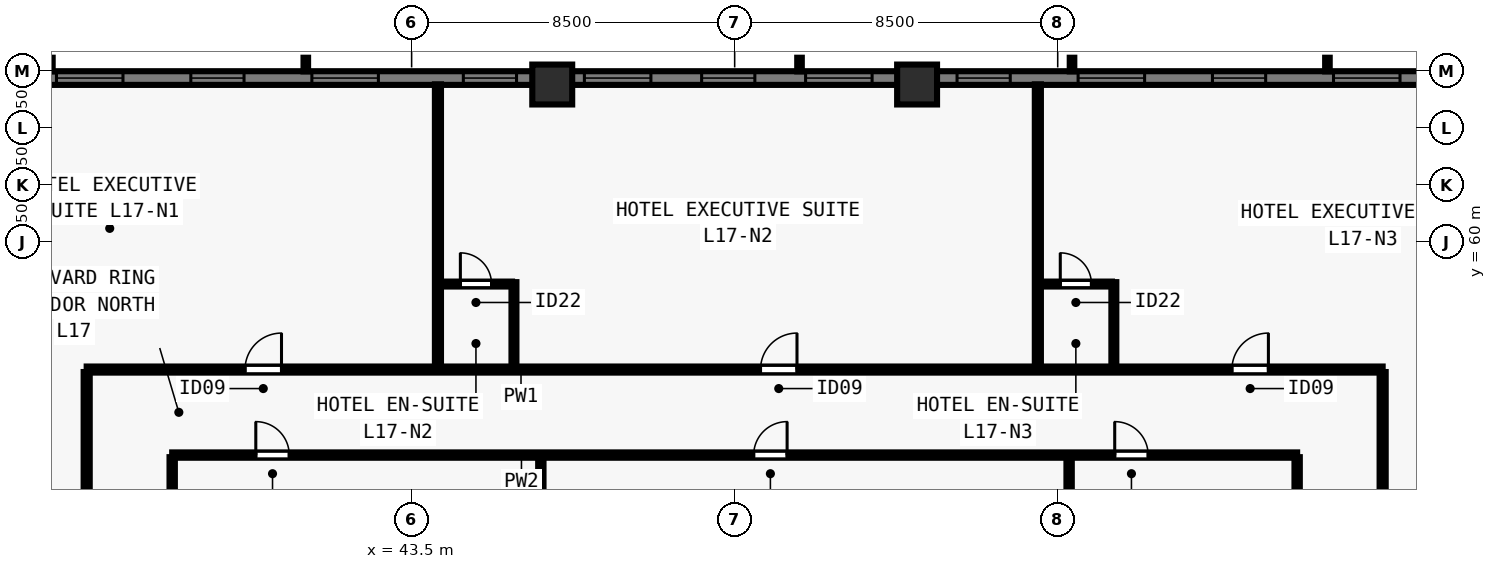
"""IFC4 building model, lengths in metres.
Left out: names, types, materials, properties, quantities, classifications, styles, units other than length and angle.
Written with IfcOpenShell. Run it as: python <this file> out.ifc"""

import sys

from ifc_helpers import new_model, si_unit, direction, frame, frame_2d, origin, origin_2d, place, context, subcontext, project, spatial, rectangle, extrude, element, fill, save


model = new_model("IFC4")
c1 = context("Model", 3, precision=1e-05, world=origin(), true_north=direction((0.0, 1.0)))
c2 = subcontext(c1, "Body", "Model", "MODEL_VIEW")
j1 = project(units=[si_unit("LENGTHUNIT", "METRE"), si_unit("PLANEANGLEUNIT", "RADIAN")], contexts=[c1])
p1 = place(None, origin())
s1 = spatial("IfcSite", under=j1, at=p1, CompositionType="ELEMENT")
p2 = place(p1, origin())
s2 = spatial("IfcBuilding", under=s1, at=p2, CompositionType="ELEMENT")
p3 = place(p2, frame((0.0, 0.0, 65.5)))
s3 = spatial("IfcBuildingStorey", under=s2, at=p3, CompositionType="ELEMENT", Elevation=65.5)
for number, where, z_axis, x_axis in (
    (1, (56.8, 64.15, 0.0), (0.0, 0.0, 1.0), (1.0, 0.0, 0.0)),
    (2, (47.2, 64.15, 0.0), (0.0, 0.0, 1.0), (1.0, 0.0, 0.0)),
):
    element("IfcColumn", number, at=place(p3, frame(where, z_axis=z_axis, x_axis=x_axis)), inside=s3, PredefinedType="COLUMN", context=c2, shape_type="SweptSolid", body=[
        extrude(rectangle(XDim=1.05, YDim=1.05, at=origin_2d()), origin(), (0.0, 0.0, 1.0), 3.5),
    ])
p4 = place(p3, frame((29.5, 64.32, 0.0), z_axis=(0.0, 0.0, 1.0), x_axis=(1.0, 0.0, 0.0)))
e3 = element("IfcWall", 3, at=p4, inside=s3, PredefinedType="SOLIDWALL", context=c2, shape_type="SweptSolid", body=[
    extrude(rectangle(XDim=44.662, YDim=0.36, at=frame_2d((22.331, 0.0))), origin(), (0.0, 0.0, 1.0), 3.28),
])
p5 = place(p4, frame((4.655, 0.0, 0.8)))
e4 = element("IfcOpeningElement", 4, at=p5, cuts=e3, PredefinedType="OPENING", context=c2, shape_type="SweptSolid", body=[
    extrude(rectangle(XDim=1.75, YDim=1.544, at=frame_2d((0.875, 0.772))), frame((0.0, 0.19, 0.0), z_axis=(0.0, -1.0, 0.0), x_axis=(1.0, 0.0, 0.0)), (0.0, 0.0, 1.0), 0.38),
])
p6 = place(p4, frame((8.19, 0.0, 0.8)))
e5 = element("IfcOpeningElement", 5, at=p6, cuts=e3, PredefinedType="OPENING", context=c2, shape_type="SweptSolid", body=[
    extrude(rectangle(XDim=1.4, YDim=1.544, at=frame_2d((0.7, 0.772))), frame((0.0, 0.19, 0.0), z_axis=(0.0, -1.0, 0.0), x_axis=(1.0, 0.0, 0.0)), (0.0, 0.0, 1.0), 0.38),
])
p7 = place(p4, frame((11.375, 0.0, 0.8)))
e6 = element("IfcOpeningElement", 6, at=p7, cuts=e3, PredefinedType="OPENING", context=c2, shape_type="SweptSolid", body=[
    extrude(rectangle(XDim=1.75, YDim=1.544, at=frame_2d((0.875, 0.772))), frame((0.0, 0.19, 0.0), z_axis=(0.0, -1.0, 0.0), x_axis=(1.0, 0.0, 0.0)), (0.0, 0.0, 1.0), 0.38),
])
p8 = place(p4, frame((15.361, 0.0, 0.8)))
e7 = element("IfcOpeningElement", 7, at=p8, cuts=e3, PredefinedType="OPENING", context=c2, shape_type="SweptSolid", body=[
    extrude(rectangle(XDim=1.4, YDim=1.544, at=frame_2d((0.7, 0.772))), frame((0.0, 0.19, 0.0), z_axis=(0.0, -1.0, 0.0), x_axis=(1.0, 0.0, 0.0)), (0.0, 0.0, 1.0), 0.38),
])
p9 = place(p4, frame((18.546, 0.0, 0.8)))
e8 = element("IfcOpeningElement", 8, at=p9, cuts=e3, PredefinedType="OPENING", context=c2, shape_type="SweptSolid", body=[
    extrude(rectangle(XDim=1.75, YDim=1.544, at=frame_2d((0.875, 0.772))), frame((0.0, 0.19, 0.0), z_axis=(0.0, -1.0, 0.0), x_axis=(1.0, 0.0, 0.0)), (0.0, 0.0, 1.0), 0.38),
])
p10 = place(p4, frame((21.631, 0.0, 0.8)))
e9 = element("IfcOpeningElement", 9, at=p10, cuts=e3, PredefinedType="OPENING", context=c2, shape_type="SweptSolid", body=[
    extrude(rectangle(XDim=1.4, YDim=1.544, at=frame_2d((0.7, 0.772))), frame((0.0, 0.19, 0.0), z_axis=(0.0, -1.0, 0.0), x_axis=(1.0, 0.0, 0.0)), (0.0, 0.0, 1.0), 0.38),
])
p11 = place(p4, frame((24.366, 0.0, 0.8)))
e10 = element("IfcOpeningElement", 10, at=p11, cuts=e3, PredefinedType="OPENING", context=c2, shape_type="SweptSolid", body=[
    extrude(rectangle(XDim=1.75, YDim=1.544, at=frame_2d((0.875, 0.772))), frame((0.0, 0.19, 0.0), z_axis=(0.0, -1.0, 0.0), x_axis=(1.0, 0.0, 0.0)), (0.0, 0.0, 1.0), 0.38),
])
p12 = place(p4, frame((28.351, 0.0, 0.8)))
e11 = element("IfcOpeningElement", 11, at=p12, cuts=e3, PredefinedType="OPENING", context=c2, shape_type="SweptSolid", body=[
    extrude(rectangle(XDim=1.4, YDim=1.544, at=frame_2d((0.7, 0.772))), frame((0.0, 0.19, 0.0), z_axis=(0.0, -1.0, 0.0), x_axis=(1.0, 0.0, 0.0)), (0.0, 0.0, 1.0), 0.38),
])
p13 = place(p4, frame((31.537, 0.0, 0.8)))
e12 = element("IfcOpeningElement", 12, at=p13, cuts=e3, PredefinedType="OPENING", context=c2, shape_type="SweptSolid", body=[
    extrude(rectangle(XDim=1.75, YDim=1.544, at=frame_2d((0.875, 0.772))), frame((0.0, 0.19, 0.0), z_axis=(0.0, -1.0, 0.0), x_axis=(1.0, 0.0, 0.0)), (0.0, 0.0, 1.0), 0.38),
])
p14 = place(p4, frame((35.072, 0.0, 0.8)))
e13 = element("IfcOpeningElement", 13, at=p14, cuts=e3, PredefinedType="OPENING", context=c2, shape_type="SweptSolid", body=[
    extrude(rectangle(XDim=1.4, YDim=1.544, at=frame_2d((0.7, 0.772))), frame((0.0, 0.19, 0.0), z_axis=(0.0, -1.0, 0.0), x_axis=(1.0, 0.0, 0.0)), (0.0, 0.0, 1.0), 0.38),
])
p15 = place(p4, frame((38.257, 0.0, 0.8)))
e14 = element("IfcOpeningElement", 14, at=p15, cuts=e3, PredefinedType="OPENING", context=c2, shape_type="SweptSolid", body=[
    extrude(rectangle(XDim=1.75, YDim=1.544, at=frame_2d((0.875, 0.772))), frame((0.0, 0.19, 0.0), z_axis=(0.0, -1.0, 0.0), x_axis=(1.0, 0.0, 0.0)), (0.0, 0.0, 1.0), 0.38),
])
p16 = place(p3, frame((34.95, 56.65, 0.0), z_axis=(0.0, 0.0, 1.0), x_axis=(1.0, 0.0, 0.0)))
e15 = element("IfcWall", 15, at=p16, inside=s3, PredefinedType="PARTITIONING", context=c2, shape_type="SweptSolid", body=[
    extrude(rectangle(XDim=34.1, YDim=0.16, at=frame_2d((17.05, 0.0))), origin(), (0.0, 0.0, 1.0), 3.28),
])
p17 = place(p16, frame((4.166, 0.0, 0.0)))
e16 = element("IfcOpeningElement", 16, at=p17, cuts=e15, PredefinedType="OPENING", context=c2, shape_type="SweptSolid", body=[
    extrude(rectangle(XDim=0.96, YDim=2.15, at=frame_2d((0.48, 1.075))), frame((0.0, 0.09, 0.0), z_axis=(0.0, -1.0, 0.0), x_axis=(1.0, 0.0, 0.0)), (0.0, 0.0, 1.0), 0.18),
])
p18 = place(p16, frame((17.73, 0.0, 0.0)))
e17 = element("IfcOpeningElement", 17, at=p18, cuts=e15, PredefinedType="OPENING", context=c2, shape_type="SweptSolid", body=[
    extrude(rectangle(XDim=0.96, YDim=2.15, at=frame_2d((0.48, 1.075))), frame((0.0, 0.09, 0.0), z_axis=(0.0, -1.0, 0.0), x_axis=(1.0, 0.0, 0.0)), (0.0, 0.0, 1.0), 0.18),
])
p19 = place(p16, frame((30.134, 0.0, 0.0)))
e18 = element("IfcOpeningElement", 18, at=p19, cuts=e15, PredefinedType="OPENING", context=c2, shape_type="SweptSolid", body=[
    extrude(rectangle(XDim=0.96, YDim=2.15, at=frame_2d((0.48, 1.075))), frame((0.0, 0.09, 0.0), z_axis=(0.0, -1.0, 0.0), x_axis=(1.0, 0.0, 0.0)), (0.0, 0.0, 1.0), 0.18),
])
p20 = place(p3, frame((34.95, 21.415, 0.0), z_axis=(0.0, 0.0, 1.0), x_axis=(0.0, 1.0, 0.0)))
e19 = element("IfcWall", 19, at=p20, inside=s3, PredefinedType="PARTITIONING", context=c2, shape_type="SweptSolid", body=[
    extrude(rectangle(XDim=35.17, YDim=0.16, at=frame_2d((17.585, 0.0))), origin(), (0.0, 0.0, 1.0), 3.28),
])
p21 = place(p20, frame((9.414, 0.0, 0.0)))
e20 = element("IfcOpeningElement", 20, at=p21, cuts=e19, PredefinedType="OPENING", context=c2, shape_type="SweptSolid", body=[
    extrude(rectangle(XDim=0.96, YDim=2.15, at=frame_2d((0.48, 1.075))), frame((0.0, 0.09, 0.0), z_axis=(0.0, -1.0, 0.0), x_axis=(1.0, 0.0, 0.0)), (0.0, 0.0, 1.0), 0.18),
])
p22 = place(p20, frame((26.814, 0.0, 0.0)))
e21 = element("IfcOpeningElement", 21, at=p22, cuts=e19, PredefinedType="OPENING", context=c2, shape_type="SweptSolid", body=[
    extrude(rectangle(XDim=0.96, YDim=2.15, at=frame_2d((0.48, 1.075))), frame((0.0, 0.09, 0.0), z_axis=(0.0, -1.0, 0.0), x_axis=(1.0, 0.0, 0.0)), (0.0, 0.0, 1.0), 0.18),
])
p23 = place(p3, frame((69.05, 21.415, 0.0), z_axis=(0.0, 0.0, 1.0), x_axis=(0.0, 1.0, 0.0)))
e22 = element("IfcWall", 22, at=p23, inside=s3, PredefinedType="PARTITIONING", context=c2, shape_type="SweptSolid", body=[
    extrude(rectangle(XDim=35.17, YDim=0.16, at=frame_2d((17.585, 0.0))), origin(), (0.0, 0.0, 1.0), 3.28),
])
p24 = place(p23, frame((9.746, 0.0, 0.0)))
e23 = element("IfcOpeningElement", 23, at=p24, cuts=e22, PredefinedType="OPENING", context=c2, shape_type="SweptSolid", body=[
    extrude(rectangle(XDim=0.96, YDim=2.15, at=frame_2d((0.48, 1.075))), frame((0.0, 0.09, 0.0), z_axis=(0.0, -1.0, 0.0), x_axis=(1.0, 0.0, 0.0)), (0.0, 0.0, 1.0), 0.18),
])
p25 = place(p23, frame((27.146, 0.0, 0.0)))
e24 = element("IfcOpeningElement", 24, at=p25, cuts=e22, PredefinedType="OPENING", context=c2, shape_type="SweptSolid", body=[
    extrude(rectangle(XDim=0.96, YDim=2.15, at=frame_2d((0.48, 1.075))), frame((0.0, 0.09, 0.0), z_axis=(0.0, -1.0, 0.0), x_axis=(1.0, 0.0, 0.0)), (0.0, 0.0, 1.0), 0.18),
])
p26 = place(p3, frame((37.2, 54.4, 0.0), z_axis=(0.0, 0.0, 1.0), x_axis=(1.0, 0.0, 0.0)))
e25 = element("IfcWall", 25, at=p26, inside=s3, PredefinedType="PARTITIONING", context=c2, shape_type="SweptSolid", body=[
    extrude(rectangle(XDim=29.6, YDim=0.14, at=frame_2d((14.8, 0.0))), origin(), (0.0, 0.0, 1.0), 3.28),
])
p27 = place(p26, frame((2.2, 0.0, 0.0)))
e26 = element("IfcOpeningElement", 26, at=p27, cuts=e25, PredefinedType="OPENING", context=c2, shape_type="SweptSolid", body=[
    extrude(rectangle(XDim=0.88, YDim=2.1, at=frame_2d((0.44, 1.05))), frame((0.0, 0.08, 0.0), z_axis=(0.0, -1.0, 0.0), x_axis=(1.0, 0.0, 0.0)), (0.0, 0.0, 1.0), 0.16),
])
p28 = place(p26, frame((15.3, 0.0, 0.0)))
e27 = element("IfcOpeningElement", 27, at=p28, cuts=e25, PredefinedType="OPENING", context=c2, shape_type="SweptSolid", body=[
    extrude(rectangle(XDim=0.88, YDim=2.1, at=frame_2d((0.44, 1.05))), frame((0.0, 0.08, 0.0), z_axis=(0.0, -1.0, 0.0), x_axis=(1.0, 0.0, 0.0)), (0.0, 0.0, 1.0), 0.16),
])
p29 = place(p26, frame((24.8, 0.0, 0.0)))
e28 = element("IfcOpeningElement", 28, at=p29, cuts=e25, PredefinedType="OPENING", context=c2, shape_type="SweptSolid", body=[
    extrude(rectangle(XDim=0.88, YDim=2.1, at=frame_2d((0.44, 1.05))), frame((0.0, 0.08, 0.0), z_axis=(0.0, -1.0, 0.0), x_axis=(1.0, 0.0, 0.0)), (0.0, 0.0, 1.0), 0.16),
])
p30 = place(p3, frame((37.2, 40.8, 0.0), z_axis=(0.0, 0.0, 1.0), x_axis=(0.0, 1.0, 0.0)))
e29 = element("IfcWall", 29, at=p30, inside=s3, PredefinedType="PARTITIONING", context=c2, shape_type="SweptSolid", body=[
    extrude(rectangle(XDim=13.545, YDim=0.14, at=frame_2d((6.772, 0.0))), origin(), (0.0, 0.0, 1.0), 3.28),
])
p31 = place(p30, frame((2.5, 0.0, 0.0)))
e30 = element("IfcOpeningElement", 30, at=p31, cuts=e29, PredefinedType="OPENING", context=c2, shape_type="SweptSolid", body=[
    extrude(rectangle(XDim=0.88, YDim=2.1, at=frame_2d((0.44, 1.05))), frame((0.0, 0.08, 0.0), z_axis=(0.0, -1.0, 0.0), x_axis=(1.0, 0.0, 0.0)), (0.0, 0.0, 1.0), 0.16),
])
p32 = place(p3, frame((66.8, 40.8, 0.0), z_axis=(0.0, 0.0, 1.0), x_axis=(0.0, 1.0, 0.0)))
e31 = element("IfcWall", 31, at=p32, inside=s3, PredefinedType="PARTITIONING", context=c2, shape_type="SweptSolid", body=[
    extrude(rectangle(XDim=13.545, YDim=0.14, at=frame_2d((6.772, 0.0))), origin(), (0.0, 0.0, 1.0), 3.28),
])
p33 = place(p32, frame((2.5, 0.0, 0.0)))
e32 = element("IfcOpeningElement", 32, at=p33, cuts=e31, PredefinedType="OPENING", context=c2, shape_type="SweptSolid", body=[
    extrude(rectangle(XDim=0.88, YDim=2.1, at=frame_2d((0.44, 1.05))), frame((0.0, 0.08, 0.0), z_axis=(0.0, -1.0, 0.0), x_axis=(1.0, 0.0, 0.0)), (0.0, 0.0, 1.0), 0.16),
])
p34 = place(p3, frame((46.9, 47.76, 0.0), z_axis=(0.0, 0.0, 1.0), x_axis=(0.0, 1.0, 0.0)))
e33 = element("IfcWall", 33, at=p34, inside=s3, PredefinedType="PARTITIONING", context=c2, shape_type="SweptSolid", body=[
    extrude(rectangle(XDim=6.585, YDim=0.14, at=frame_2d((3.292, 0.0))), origin(), (0.0, 0.0, 1.0), 3.28),
])
p35 = place(p3, frame((60.8, 47.76, 0.0), z_axis=(0.0, 0.0, 1.0), x_axis=(0.0, 1.0, 0.0)))
e34 = element("IfcWall", 34, at=p35, inside=s3, PredefinedType="PARTITIONING", context=c2, shape_type="SweptSolid", body=[
    extrude(rectangle(XDim=6.585, YDim=0.14, at=frame_2d((3.292, 0.0))), origin(), (0.0, 0.0, 1.0), 2.439),
])
p36 = place(p3, frame((44.192, 56.715, 0.0), z_axis=(0.0, 0.0, 1.0), x_axis=(0.0, 1.0, 0.0)))
e35 = element("IfcWall", 35, at=p36, inside=s3, PredefinedType="PARTITIONING", context=c2, shape_type="SweptSolid", body=[
    extrude(rectangle(XDim=7.44, YDim=0.16, at=frame_2d((3.72, 0.0))), origin(), (0.0, 0.0, 1.0), 3.28),
])
p37 = place(p3, frame((46.192, 56.715, 0.0), z_axis=(0.0, 0.0, 1.0), x_axis=(0.0, 1.0, 0.0)))
e36 = element("IfcWall", 36, at=p37, inside=s3, PredefinedType="PLUMBINGWALL", context=c2, shape_type="SweptSolid", body=[
    extrude(rectangle(XDim=2.235, YDim=0.13, at=frame_2d((1.117, 0.0))), origin(), (0.0, 0.0, 1.0), 3.28),
])
p38 = place(p3, frame((44.258, 58.9, 0.0), z_axis=(0.0, 0.0, 1.0), x_axis=(1.0, 0.0, 0.0)))
e37 = element("IfcWall", 37, at=p38, inside=s3, PredefinedType="PLUMBINGWALL", context=c2, shape_type="SweptSolid", body=[
    extrude(rectangle(XDim=1.885, YDim=0.13, at=frame_2d((0.942, 0.0))), origin(), (0.0, 0.0, 1.0), 3.28),
])
p39 = place(p38, frame((0.525, 0.0, 0.0)))
e38 = element("IfcOpeningElement", 38, at=p39, cuts=e37, PredefinedType="OPENING", context=c2, shape_type="SweptSolid", body=[
    extrude(rectangle(XDim=0.82, YDim=2.1, at=frame_2d((0.41, 1.05))), frame((0.0, 0.075, 0.0), z_axis=(0.0, -1.0, 0.0), x_axis=(1.0, 0.0, 0.0)), (0.0, 0.0, 1.0), 0.15),
])
p40 = place(p3, frame((59.978, 56.715, 0.0), z_axis=(0.0, 0.0, 1.0), x_axis=(0.0, 1.0, 0.0)))
e39 = element("IfcWall", 39, at=p40, inside=s3, PredefinedType="PARTITIONING", context=c2, shape_type="SweptSolid", body=[
    extrude(rectangle(XDim=7.44, YDim=0.16, at=frame_2d((3.72, 0.0))), origin(), (0.0, 0.0, 1.0), 3.28),
])
p41 = place(p3, frame((61.978, 56.715, 0.0), z_axis=(0.0, 0.0, 1.0), x_axis=(0.0, 1.0, 0.0)))
e40 = element("IfcWall", 40, at=p41, inside=s3, PredefinedType="PLUMBINGWALL", context=c2, shape_type="SweptSolid", body=[
    extrude(rectangle(XDim=2.235, YDim=0.13, at=frame_2d((1.117, 0.0))), origin(), (0.0, 0.0, 1.0), 3.28),
])
p42 = place(p3, frame((60.042, 58.9, 0.0), z_axis=(0.0, 0.0, 1.0), x_axis=(1.0, 0.0, 0.0)))
e41 = element("IfcWall", 41, at=p42, inside=s3, PredefinedType="PLUMBINGWALL", context=c2, shape_type="SweptSolid", body=[
    extrude(rectangle(XDim=1.885, YDim=0.13, at=frame_2d((0.942, 0.0))), origin(), (0.0, 0.0, 1.0), 3.28),
])
p43 = place(p42, frame((0.525, 0.0, 0.0)))
e42 = element("IfcOpeningElement", 42, at=p43, cuts=e41, PredefinedType="OPENING", context=c2, shape_type="SweptSolid", body=[
    extrude(rectangle(XDim=0.82, YDim=2.1, at=frame_2d((0.41, 1.05))), frame((0.0, 0.075, 0.0), z_axis=(0.0, -1.0, 0.0), x_axis=(1.0, 0.0, 0.0)), (0.0, 0.0, 1.0), 0.15),
])
p44 = place(p5, origin())
e43 = element("IfcWindow", 43, at=p44, inside=s3, PartitioningType="SINGLE_PANEL", PredefinedType="WINDOW", context=c2, shape_type="SweptSolid", body=[
    extrude(rectangle(XDim=1.75, YDim=1.544, at=frame_2d((0.875, 0.772))), frame((0.0, -0.05, 0.0), z_axis=(0.0, -1.0, 0.0), x_axis=(1.0, 0.0, 0.0)), (0.0, 0.0, 1.0), 0.06),
])
fill(e4, e43)
p45 = place(p6, origin())
e44 = element("IfcWindow", 44, at=p45, inside=s3, PartitioningType="SINGLE_PANEL", PredefinedType="WINDOW", context=c2, shape_type="SweptSolid", body=[
    extrude(rectangle(XDim=1.4, YDim=1.544, at=frame_2d((0.7, 0.772))), frame((0.0, -0.05, 0.0), z_axis=(0.0, -1.0, 0.0), x_axis=(1.0, 0.0, 0.0)), (0.0, 0.0, 1.0), 0.06),
])
fill(e5, e44)
p46 = place(p7, origin())
e45 = element("IfcWindow", 45, at=p46, inside=s3, PartitioningType="SINGLE_PANEL", PredefinedType="WINDOW", context=c2, shape_type="SweptSolid", body=[
    extrude(rectangle(XDim=1.75, YDim=1.544, at=frame_2d((0.875, 0.772))), frame((0.0, -0.05, 0.0), z_axis=(0.0, -1.0, 0.0), x_axis=(1.0, 0.0, 0.0)), (0.0, 0.0, 1.0), 0.06),
])
fill(e6, e45)
p47 = place(p8, origin())
e46 = element("IfcWindow", 46, at=p47, inside=s3, PartitioningType="SINGLE_PANEL", PredefinedType="WINDOW", context=c2, shape_type="SweptSolid", body=[
    extrude(rectangle(XDim=1.4, YDim=1.544, at=frame_2d((0.7, 0.772))), frame((0.0, -0.05, 0.0), z_axis=(0.0, -1.0, 0.0), x_axis=(1.0, 0.0, 0.0)), (0.0, 0.0, 1.0), 0.06),
])
fill(e7, e46)
p48 = place(p9, origin())
e47 = element("IfcWindow", 47, at=p48, inside=s3, PartitioningType="SINGLE_PANEL", PredefinedType="WINDOW", context=c2, shape_type="SweptSolid", body=[
    extrude(rectangle(XDim=1.75, YDim=1.544, at=frame_2d((0.875, 0.772))), frame((0.0, -0.05, 0.0), z_axis=(0.0, -1.0, 0.0), x_axis=(1.0, 0.0, 0.0)), (0.0, 0.0, 1.0), 0.06),
])
fill(e8, e47)
p49 = place(p10, origin())
e48 = element("IfcWindow", 48, at=p49, inside=s3, PartitioningType="SINGLE_PANEL", PredefinedType="WINDOW", context=c2, shape_type="SweptSolid", body=[
    extrude(rectangle(XDim=1.4, YDim=1.544, at=frame_2d((0.7, 0.772))), frame((0.0, -0.05, 0.0), z_axis=(0.0, -1.0, 0.0), x_axis=(1.0, 0.0, 0.0)), (0.0, 0.0, 1.0), 0.06),
])
fill(e9, e48)
p50 = place(p11, origin())
e49 = element("IfcWindow", 49, at=p50, inside=s3, PartitioningType="SINGLE_PANEL", PredefinedType="WINDOW", context=c2, shape_type="SweptSolid", body=[
    extrude(rectangle(XDim=1.75, YDim=1.544, at=frame_2d((0.875, 0.772))), frame((0.0, -0.05, 0.0), z_axis=(0.0, -1.0, 0.0), x_axis=(1.0, 0.0, 0.0)), (0.0, 0.0, 1.0), 0.06),
])
fill(e10, e49)
p51 = place(p12, origin())
e50 = element("IfcWindow", 50, at=p51, inside=s3, PartitioningType="SINGLE_PANEL", PredefinedType="WINDOW", context=c2, shape_type="SweptSolid", body=[
    extrude(rectangle(XDim=1.4, YDim=1.544, at=frame_2d((0.7, 0.772))), frame((0.0, -0.05, 0.0), z_axis=(0.0, -1.0, 0.0), x_axis=(1.0, 0.0, 0.0)), (0.0, 0.0, 1.0), 0.06),
])
fill(e11, e50)
p52 = place(p13, origin())
e51 = element("IfcWindow", 51, at=p52, inside=s3, PartitioningType="SINGLE_PANEL", PredefinedType="WINDOW", context=c2, shape_type="SweptSolid", body=[
    extrude(rectangle(XDim=1.75, YDim=1.544, at=frame_2d((0.875, 0.772))), frame((0.0, -0.05, 0.0), z_axis=(0.0, -1.0, 0.0), x_axis=(1.0, 0.0, 0.0)), (0.0, 0.0, 1.0), 0.06),
])
fill(e12, e51)
p53 = place(p14, origin())
e52 = element("IfcWindow", 52, at=p53, inside=s3, PartitioningType="SINGLE_PANEL", PredefinedType="WINDOW", context=c2, shape_type="SweptSolid", body=[
    extrude(rectangle(XDim=1.4, YDim=1.544, at=frame_2d((0.7, 0.772))), frame((0.0, -0.05, 0.0), z_axis=(0.0, -1.0, 0.0), x_axis=(1.0, 0.0, 0.0)), (0.0, 0.0, 1.0), 0.06),
])
fill(e13, e52)
p54 = place(p15, origin())
e53 = element("IfcWindow", 53, at=p54, inside=s3, PartitioningType="SINGLE_PANEL", PredefinedType="WINDOW", context=c2, shape_type="SweptSolid", body=[
    extrude(rectangle(XDim=1.75, YDim=1.544, at=frame_2d((0.875, 0.772))), frame((0.0, -0.05, 0.0), z_axis=(0.0, -1.0, 0.0), x_axis=(1.0, 0.0, 0.0)), (0.0, 0.0, 1.0), 0.06),
])
fill(e14, e53)
p55 = place(p27, origin())
e54 = element("IfcDoor", 54, at=p55, inside=s3, OperationType="SINGLE_SWING_LEFT", PredefinedType="DOOR", context=c2, shape_type="SweptSolid", body=[
    extrude(rectangle(XDim=0.88, YDim=2.1, at=frame_2d((0.44, 1.05))), frame((0.0, 0.025, 0.0), z_axis=(0.0, -1.0, 0.0), x_axis=(1.0, 0.0, 0.0)), (0.0, 0.0, 1.0), 0.05),
])
fill(e26, e54)
p56 = place(p28, origin())
e55 = element("IfcDoor", 55, at=p56, inside=s3, OperationType="SINGLE_SWING_RIGHT", PredefinedType="DOOR", context=c2, shape_type="SweptSolid", body=[
    extrude(rectangle(XDim=0.88, YDim=2.1, at=frame_2d((0.44, 1.05))), frame((0.0, 0.025, 0.0), z_axis=(0.0, -1.0, 0.0), x_axis=(1.0, 0.0, 0.0)), (0.0, 0.0, 1.0), 0.05),
])
fill(e27, e55)
p57 = place(p29, origin())
e56 = element("IfcDoor", 56, at=p57, inside=s3, OperationType="SINGLE_SWING_LEFT", PredefinedType="DOOR", context=c2, shape_type="SweptSolid", body=[
    extrude(rectangle(XDim=0.88, YDim=2.1, at=frame_2d((0.44, 1.05))), frame((0.0, 0.025, 0.0), z_axis=(0.0, -1.0, 0.0), x_axis=(1.0, 0.0, 0.0)), (0.0, 0.0, 1.0), 0.05),
])
fill(e28, e56)
p58 = place(p17, origin())
e57 = element("IfcDoor", 57, at=p58, inside=s3, OperationType="SINGLE_SWING_RIGHT", PredefinedType="DOOR", context=c2, shape_type="SweptSolid", body=[
    extrude(rectangle(XDim=0.96, YDim=2.15, at=frame_2d((0.48, 1.075))), frame((0.0, 0.025, 0.0), z_axis=(0.0, -1.0, 0.0), x_axis=(1.0, 0.0, 0.0)), (0.0, 0.0, 1.0), 0.05),
])
fill(e16, e57)
p59 = place(p39, origin())
e58 = element("IfcDoor", 58, at=p59, inside=s3, OperationType="SINGLE_SWING_LEFT", PredefinedType="DOOR", context=c2, shape_type="SweptSolid", body=[
    extrude(rectangle(XDim=0.82, YDim=2.1, at=frame_2d((0.41, 1.05))), frame((0.0, 0.025, 0.0), z_axis=(0.0, -1.0, 0.0), x_axis=(1.0, 0.0, 0.0)), (0.0, 0.0, 1.0), 0.05),
])
fill(e38, e58)
p60 = place(p18, origin())
e59 = element("IfcDoor", 59, at=p60, inside=s3, OperationType="SINGLE_SWING_RIGHT", PredefinedType="DOOR", context=c2, shape_type="SweptSolid", body=[
    extrude(rectangle(XDim=0.96, YDim=2.15, at=frame_2d((0.48, 1.075))), frame((0.0, 0.025, 0.0), z_axis=(0.0, -1.0, 0.0), x_axis=(1.0, 0.0, 0.0)), (0.0, 0.0, 1.0), 0.05),
])
fill(e17, e59)
p61 = place(p43, origin())
e60 = element("IfcDoor", 60, at=p61, inside=s3, OperationType="SINGLE_SWING_LEFT", PredefinedType="DOOR", context=c2, shape_type="SweptSolid", body=[
    extrude(rectangle(XDim=0.82, YDim=2.1, at=frame_2d((0.41, 1.05))), frame((0.0, 0.025, 0.0), z_axis=(0.0, -1.0, 0.0), x_axis=(1.0, 0.0, 0.0)), (0.0, 0.0, 1.0), 0.05),
])
fill(e42, e60)
p62 = place(p19, origin())
e61 = element("IfcDoor", 61, at=p62, inside=s3, OperationType="SINGLE_SWING_RIGHT", PredefinedType="DOOR", context=c2, shape_type="SweptSolid", body=[
    extrude(rectangle(XDim=0.96, YDim=2.15, at=frame_2d((0.48, 1.075))), frame((0.0, 0.025, 0.0), z_axis=(0.0, -1.0, 0.0), x_axis=(1.0, 0.0, 0.0)), (0.0, 0.0, 1.0), 0.05),
])
fill(e18, e61)
save(model, sys.argv[1])
